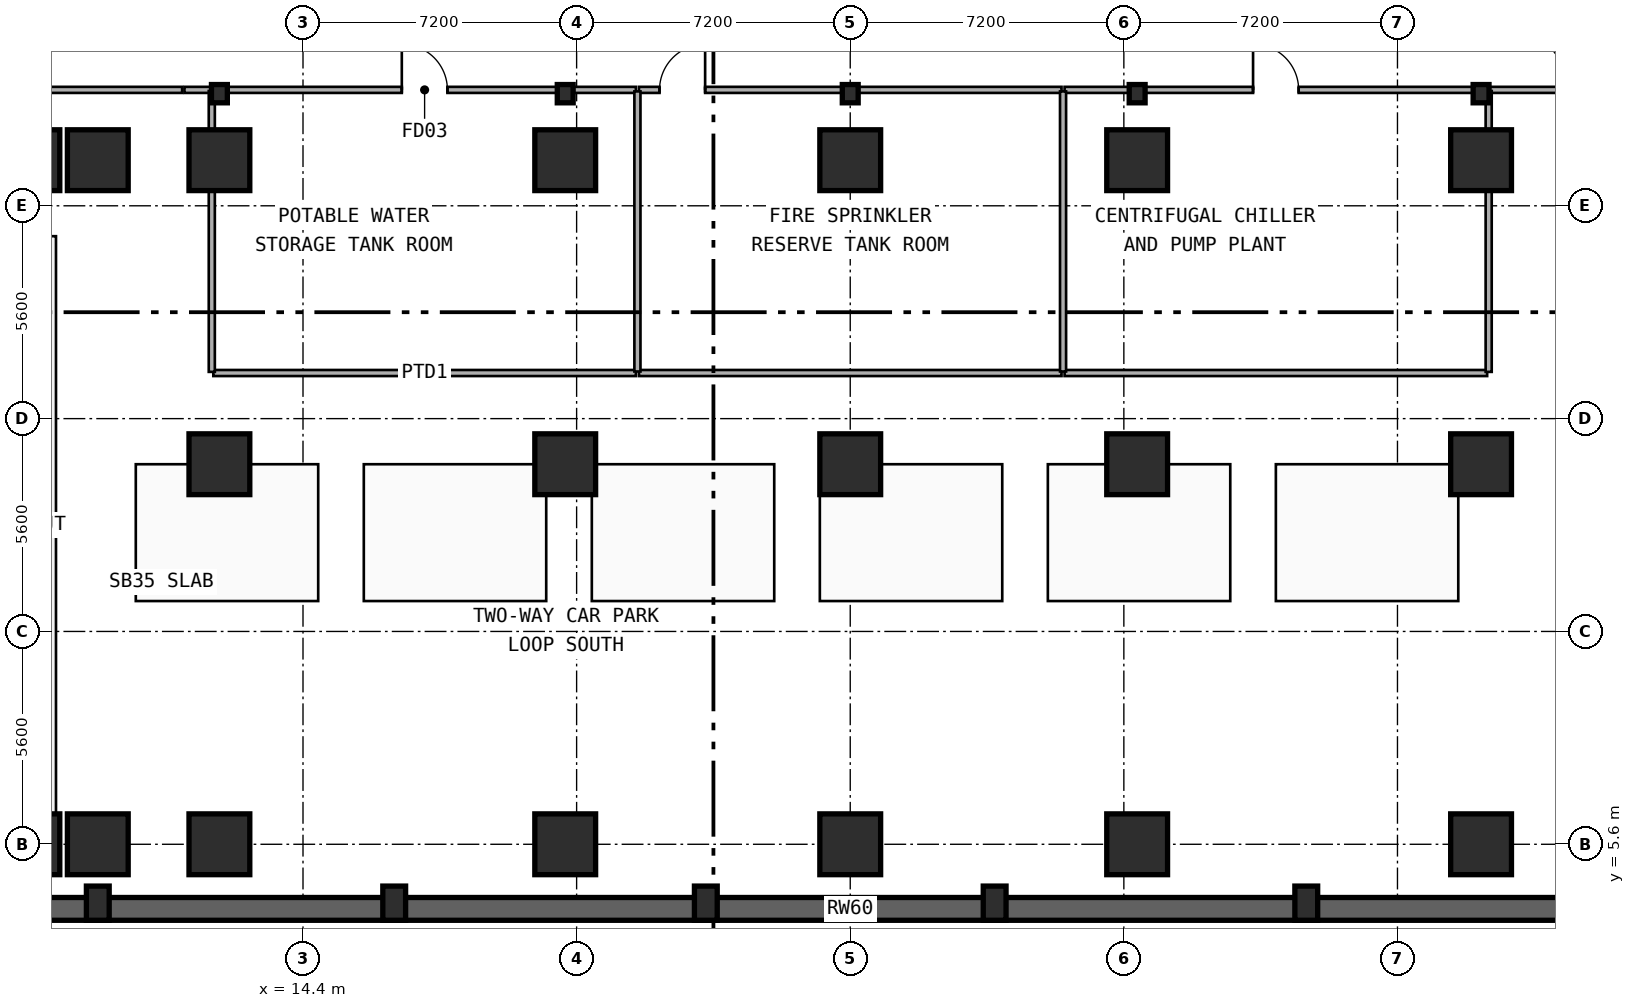
"""IFC4 building model, lengths in metres.
Left out: names, types, materials, properties, quantities, classifications, styles, units other than length and angle.
Written with IfcOpenShell. Run it as: python <this file> out.ifc"""

import sys

from ifc_helpers import new_model, si_unit, direction, frame, frame_2d, origin, origin_2d, place, context, subcontext, project, spatial, rectangle, i_section, extrude, element, fill, save


model = new_model("IFC4")
c1 = context("Model", 3, precision=1e-05, world=origin(), true_north=direction((0.0, 1.0)))
c2 = subcontext(c1, "Body", "Model", "MODEL_VIEW")
j1 = project(units=[si_unit("LENGTHUNIT", "METRE"), si_unit("PLANEANGLEUNIT", "RADIAN")], contexts=[c1])
p1 = place(None, origin())
s1 = spatial("IfcSite", under=j1, at=p1, CompositionType="ELEMENT")
p2 = place(p1, origin())
s2 = spatial("IfcBuilding", under=s1, at=p2, CompositionType="ELEMENT")
p3 = place(p2, frame((0.0, 0.0, -13.2)))
s3 = spatial("IfcBuildingStorey", under=s2, at=p3, CompositionType="ELEMENT", Elevation=-13.2)
p4 = place(p3, frame((0.3, 3.9, 0.0), z_axis=(0.0, 0.0, 1.0), x_axis=(1.0, 0.0, 0.0)))
e1 = element("IfcWall", 1, at=p4, inside=s3, PredefinedType="USERDEFINED", context=c2, shape_type="SweptSolid", body=[
    extrude(rectangle(XDim=57.0, YDim=0.6, at=frame_2d((28.5, 0.0))), origin(), (0.0, 0.0, 1.0), 4.4),
])
for number, where, z_axis, x_axis in (
    (2, (12.2, 25.35, 0.0), (0.0, 0.0, 1.0), (1.0, 0.0, 0.0)),
    (3, (21.3, 25.35, 0.0), (0.0, 0.0, 1.0), (1.0, 0.0, 0.0)),
    (4, (28.8, 25.35, 0.0), (0.0, 0.0, 1.0), (1.0, 0.0, 0.0)),
    (5, (36.35, 25.35, 0.0), (0.0, 0.0, 1.0), (1.0, 0.0, 0.0)),
    (6, (45.4, 25.35, 0.0), (0.0, 0.0, 1.0), (1.0, 0.0, 0.0)),
):
    element("IfcColumn", number, at=place(p3, frame(where, z_axis=z_axis, x_axis=x_axis)), inside=s3, PredefinedType="COLUMN", context=c2, shape_type="SweptSolid", body=[
        extrude(i_section(OverallWidth=0.418, OverallDepth=0.481, WebThickness=0.043, FlangeThickness=0.068, FilletRadius=0.015, at=origin_2d()), origin(), (0.0, 0.0, 1.0), 4.4),
    ])
for number, where, z_axis, x_axis in (
    (7, (7.2, 5.6, 0.0), (0.0, 0.0, 1.0), (1.0, 0.0, 0.0)),
    (8, (7.2, 23.6, 0.0), (0.0, 0.0, 1.0), (1.0, 0.0, 0.0)),
    (9, (9.0, 5.6, 0.0), (0.0, 0.0, 1.0), (1.0, 0.0, 0.0)),
    (10, (9.0, 23.6, 0.0), (0.0, 0.0, 1.0), (1.0, 0.0, 0.0)),
    (11, (12.2, 5.6, 0.0), (0.0, 0.0, 1.0), (1.0, 0.0, 0.0)),
    (12, (12.2, 15.6, 0.0), (0.0, 0.0, 1.0), (1.0, 0.0, 0.0)),
    (13, (12.2, 23.6, 0.0), (0.0, 0.0, 1.0), (1.0, 0.0, 0.0)),
    (14, (21.3, 5.6, 0.0), (0.0, 0.0, 1.0), (1.0, 0.0, 0.0)),
    (15, (21.3, 15.6, 0.0), (0.0, 0.0, 1.0), (1.0, 0.0, 0.0)),
    (16, (21.3, 23.6, 0.0), (0.0, 0.0, 1.0), (1.0, 0.0, 0.0)),
    (17, (28.8, 5.6, 0.0), (0.0, 0.0, 1.0), (1.0, 0.0, 0.0)),
    (18, (28.8, 15.6, 0.0), (0.0, 0.0, 1.0), (1.0, 0.0, 0.0)),
    (19, (28.8, 23.6, 0.0), (0.0, 0.0, 1.0), (1.0, 0.0, 0.0)),
    (20, (36.35, 5.6, 0.0), (0.0, 0.0, 1.0), (1.0, 0.0, 0.0)),
    (21, (36.35, 15.6, 0.0), (0.0, 0.0, 1.0), (1.0, 0.0, 0.0)),
    (22, (36.35, 23.6, 0.0), (0.0, 0.0, 1.0), (1.0, 0.0, 0.0)),
    (23, (45.4, 5.6, 0.0), (0.0, 0.0, 1.0), (1.0, 0.0, 0.0)),
    (24, (45.4, 15.6, 0.0), (0.0, 0.0, 1.0), (1.0, 0.0, 0.0)),
    (25, (45.4, 23.6, 0.0), (0.0, 0.0, 1.0), (1.0, 0.0, 0.0)),
):
    element("IfcColumn", number, at=place(p3, frame(where, z_axis=z_axis, x_axis=x_axis)), inside=s3, PredefinedType="COLUMN", context=c2, shape_type="SweptSolid", body=[
        extrude(rectangle(XDim=1.6, YDim=1.6, at=origin_2d()), origin(), (0.0, 0.0, 1.0), 4.4),
    ])
for number, where, z_axis, x_axis in (
    (26, (9.0, 4.05, 0.0), (0.0, 0.0, 1.0), (1.0, 0.0, 0.0)),
    (27, (16.8, 4.05, 0.0), (0.0, 0.0, 1.0), (1.0, 0.0, 0.0)),
    (28, (25.0, 4.05, 0.0), (0.0, 0.0, 1.0), (1.0, 0.0, 0.0)),
    (29, (32.6, 4.05, 0.0), (0.0, 0.0, 1.0), (1.0, 0.0, 0.0)),
    (30, (40.8, 4.05, 0.0), (0.0, 0.0, 1.0), (1.0, 0.0, 0.0)),
):
    element("IfcColumn", number, at=place(p3, frame(where, z_axis=z_axis, x_axis=x_axis)), inside=s3, PredefinedType="PILASTER", context=c2, shape_type="SweptSolid", body=[
        extrude(rectangle(XDim=0.6, YDim=0.9, at=origin_2d()), origin(), (0.0, 0.0, 1.0), 4.4),
    ])
p5 = place(p3, frame((12.04, 25.45, 0.0), z_axis=(0.0, 0.0, 1.0), x_axis=(1.0, 0.0, 0.0)))
e31 = element("IfcWall", 31, at=p5, inside=s3, PredefinedType="PARTITIONING", context=c2, shape_type="SweptSolid", body=[
    extrude(rectangle(XDim=11.12, YDim=0.16, at=frame_2d((5.56, 0.0))), origin(), (0.0, 0.0, 1.0), 3.246),
])
p6 = place(p5, frame((4.96, 0.0, 0.0)))
e32 = element("IfcOpeningElement", 32, at=p6, cuts=e31, PredefinedType="OPENING", context=c2, shape_type="SweptSolid", body=[
    extrude(rectangle(XDim=1.2, YDim=2.15, at=frame_2d((0.6, 1.075))), frame((0.0, 0.09, 0.0), z_axis=(0.0, -1.0, 0.0), x_axis=(1.0, 0.0, 0.0)), (0.0, 0.0, 1.0), 0.18),
])
p7 = place(p3, frame((23.24, 25.45, 0.0), z_axis=(0.0, 0.0, 1.0), x_axis=(1.0, 0.0, 0.0)))
e33 = element("IfcWall", 33, at=p7, inside=s3, PredefinedType="PARTITIONING", context=c2, shape_type="SweptSolid", body=[
    extrude(rectangle(XDim=11.12, YDim=0.16, at=frame_2d((5.56, 0.0))), origin(), (0.0, 0.0, 1.0), 4.08),
])
p8 = place(p7, frame((0.542, 0.0, 0.0)))
e34 = element("IfcOpeningElement", 34, at=p8, cuts=e33, PredefinedType="OPENING", context=c2, shape_type="SweptSolid", body=[
    extrude(rectangle(XDim=1.2, YDim=2.15, at=frame_2d((0.6, 1.075))), frame((0.0, 0.09, 0.0), z_axis=(0.0, -1.0, 0.0), x_axis=(1.0, 0.0, 0.0)), (0.0, 0.0, 1.0), 0.18),
])
p9 = place(p3, frame((34.44, 25.45, 0.0), z_axis=(0.0, 0.0, 1.0), x_axis=(1.0, 0.0, 0.0)))
e35 = element("IfcWall", 35, at=p9, inside=s3, PredefinedType="PARTITIONING", context=c2, shape_type="SweptSolid", body=[
    extrude(rectangle(XDim=11.12, YDim=0.16, at=frame_2d((5.56, 0.0))), origin(), (0.0, 0.0, 1.0), 3.246),
])
p10 = place(p9, frame((4.96, 0.0, 0.0)))
e36 = element("IfcOpeningElement", 36, at=p10, cuts=e35, PredefinedType="OPENING", context=c2, shape_type="SweptSolid", body=[
    extrude(rectangle(XDim=1.2, YDim=2.15, at=frame_2d((0.6, 1.075))), frame((0.0, 0.09, 0.0), z_axis=(0.0, -1.0, 0.0), x_axis=(1.0, 0.0, 0.0)), (0.0, 0.0, 1.0), 0.18),
])
p11 = place(p3, frame((12.04, 18.0, 0.0), z_axis=(0.0, 0.0, 1.0), x_axis=(1.0, 0.0, 0.0)))
e37 = element("IfcWall", 37, at=p11, inside=s3, PredefinedType="PARTITIONING", context=c2, shape_type="SweptSolid", body=[
    extrude(rectangle(XDim=11.12, YDim=0.16, at=frame_2d((5.56, 0.0))), origin(), (0.0, 0.0, 1.0), 3.246),
])
p12 = place(p3, frame((23.24, 18.0, 0.0), z_axis=(0.0, 0.0, 1.0), x_axis=(1.0, 0.0, 0.0)))
e38 = element("IfcWall", 38, at=p12, inside=s3, PredefinedType="PARTITIONING", context=c2, shape_type="SweptSolid", body=[
    extrude(rectangle(XDim=11.12, YDim=0.16, at=frame_2d((5.56, 0.0))), origin(), (0.0, 0.0, 1.0), 4.08),
])
p13 = place(p3, frame((34.44, 18.0, 0.0), z_axis=(0.0, 0.0, 1.0), x_axis=(1.0, 0.0, 0.0)))
e39 = element("IfcWall", 39, at=p13, inside=s3, PredefinedType="PARTITIONING", context=c2, shape_type="SweptSolid", body=[
    extrude(rectangle(XDim=11.12, YDim=0.16, at=frame_2d((5.56, 0.0))), origin(), (0.0, 0.0, 1.0), 3.246),
])
for number, where, z_axis, x_axis in (
    (40, (23.2, 18.04, 0.0), (0.0, 0.0, 1.0), (0.0, 1.0, 0.0)),
    (41, (34.4, 18.04, 0.0), (0.0, 0.0, 1.0), (0.0, 1.0, 0.0)),
):
    element("IfcWall", number, at=place(p3, frame(where, z_axis=z_axis, x_axis=x_axis)), inside=s3, PredefinedType="PARTITIONING", context=c2, shape_type="SweptSolid", body=[
        extrude(rectangle(XDim=7.37, YDim=0.16, at=frame_2d((3.685, 0.0))), origin(), (0.0, 0.0, 1.0), 2.66),
    ])
p14 = place(p3, frame((11.28, 25.45, 0.0), z_axis=(0.0, 0.0, 1.0), x_axis=(1.0, 0.0, 0.0)))
e42 = element("IfcWall", 42, at=p14, inside=s3, PredefinedType="PARTITIONING", context=c2, shape_type="SweptSolid", body=[
    extrude(rectangle(XDim=0.69, YDim=0.16, at=frame_2d((0.345, 0.0))), origin(), (0.0, 0.0, 1.0), 3.246),
])
p15 = place(p3, frame((45.63, 25.45, 0.0), z_axis=(0.0, 0.0, 1.0), x_axis=(1.0, 0.0, 0.0)))
e43 = element("IfcWall", 43, at=p15, inside=s3, PredefinedType="PARTITIONING", context=c2, shape_type="SweptSolid", body=[
    extrude(rectangle(XDim=2.39, YDim=0.16, at=frame_2d((1.195, 0.0))), origin(), (0.0, 0.0, 1.0), 3.246),
])
p16 = place(p3, frame((1.83, 25.45, 0.0), z_axis=(0.0, 0.0, 1.0), x_axis=(1.0, 0.0, 0.0)))
e44 = element("IfcWall", 44, at=p16, inside=s3, PredefinedType="PARTITIONING", context=c2, shape_type="SweptSolid", body=[
    extrude(rectangle(XDim=9.39, YDim=0.16, at=frame_2d((4.695, 0.0))), origin(), (0.0, 0.0, 1.0), 4.08),
])
for number, where, z_axis, x_axis in (
    (45, (12.0, 18.03, 0.0), (0.0, 0.0, 1.0), (0.0, 1.0, 0.0)),
    (46, (45.6, 18.03, 0.0), (0.0, 0.0, 1.0), (0.0, 1.0, 0.0)),
):
    element("IfcWall", number, at=place(p3, frame(where, z_axis=z_axis, x_axis=x_axis)), inside=s3, PredefinedType="PARTITIONING", context=c2, shape_type="SweptSolid", body=[
        extrude(rectangle(XDim=7.39, YDim=0.16, at=frame_2d((3.695, 0.0))), origin(), (0.0, 0.0, 1.0), 2.66),
    ])
p17 = place(p6, origin())
e47 = element("IfcDoor", 47, at=p17, inside=s3, OperationType="SINGLE_SWING_LEFT", PredefinedType="DOOR", context=c2, shape_type="SweptSolid", body=[
    extrude(rectangle(XDim=1.2, YDim=2.15, at=frame_2d((0.6, 1.075))), frame((0.0, 0.025, 0.0), z_axis=(0.0, -1.0, 0.0), x_axis=(1.0, 0.0, 0.0)), (0.0, 0.0, 1.0), 0.05),
])
fill(e32, e47)
p18 = place(p8, origin())
e48 = element("IfcDoor", 48, at=p18, inside=s3, OperationType="SINGLE_SWING_RIGHT", PredefinedType="DOOR", context=c2, shape_type="SweptSolid", body=[
    extrude(rectangle(XDim=1.2, YDim=2.15, at=frame_2d((0.6, 1.075))), frame((0.0, 0.025, 0.0), z_axis=(0.0, -1.0, 0.0), x_axis=(1.0, 0.0, 0.0)), (0.0, 0.0, 1.0), 0.05),
])
fill(e34, e48)
p19 = place(p10, origin())
e49 = element("IfcDoor", 49, at=p19, inside=s3, OperationType="SINGLE_SWING_LEFT", PredefinedType="DOOR", context=c2, shape_type="SweptSolid", body=[
    extrude(rectangle(XDim=1.2, YDim=2.15, at=frame_2d((0.6, 1.075))), frame((0.0, 0.025, 0.0), z_axis=(0.0, -1.0, 0.0), x_axis=(1.0, 0.0, 0.0)), (0.0, 0.0, 1.0), 0.05),
])
fill(e36, e49)
save(model, sys.argv[1])
